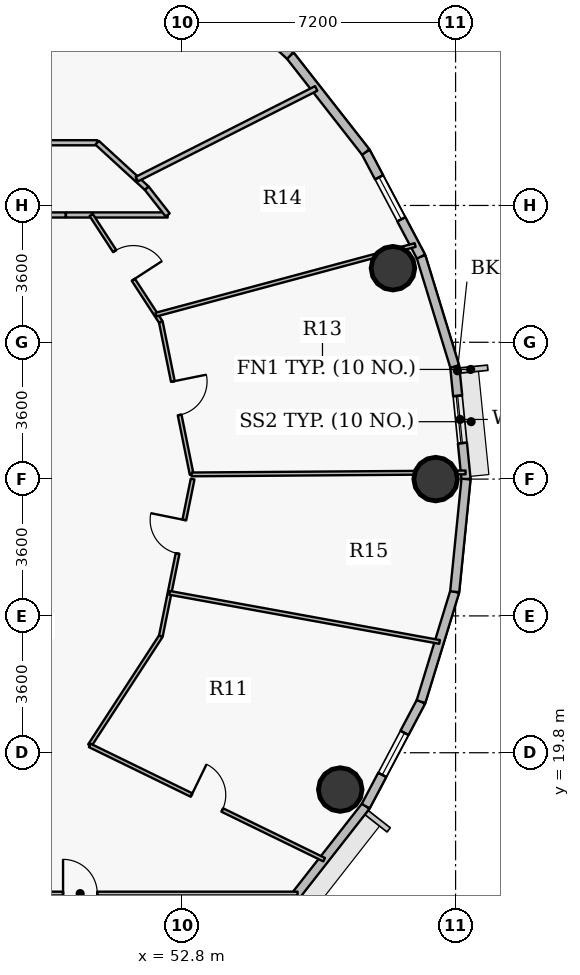
"""IFC4 building model, lengths in metres.
Left out: names, types, materials, properties, quantities, classifications, styles, units other than length and angle.
Written with IfcOpenShell. Run it as: python <this file> out.ifc"""

import sys

from ifc_helpers import new_model, si_unit, direction, frame, frame_2d, origin, origin_2d, place, context, subcontext, project, spatial, rectangle, hollow_circle, extrude, source, transform, mapped, element, fill, save


model = new_model("IFC4")
c1 = context("Model", 3, precision=1e-05, world=origin(), true_north=direction((0.0, 1.0)))
c2 = subcontext(c1, "Body", "Model", "MODEL_VIEW")
j1 = project(units=[si_unit("LENGTHUNIT", "METRE"), si_unit("PLANEANGLEUNIT", "RADIAN")], contexts=[c1])
p1 = place(None, origin())
s1 = spatial("IfcSite", under=j1, at=p1, CompositionType="ELEMENT")
p2 = place(p1, origin())
s2 = spatial("IfcBuilding", under=s1, at=p2, CompositionType="ELEMENT")
p3 = place(p2, frame((0.0, 0.0, 225.3)))
s3 = spatial("IfcBuildingStorey", under=s2, at=p3, CompositionType="ELEMENT", Elevation=225.3)
for number, where, z_axis, x_axis in (
    (1, (59.475, 27.0, 0.0), (0.0, 0.0, 1.0), (1.0, 0.0, 0.0)),
    (2, (58.351, 32.549, 0.0), (0.0, 0.0, 1.0), (1.0, 0.0, 0.0)),
    (3, (56.965, 18.831, 0.0), (0.0, 0.0, 1.0), (1.0, 0.0, 0.0)),
):
    element("IfcColumn", number, at=place(p3, frame(where, z_axis=z_axis, x_axis=x_axis)), inside=s3, PredefinedType="COLUMN", context=c2, shape_type="SweptSolid", body=[
        extrude(hollow_circle(Radius=0.575, WallThickness=0.036, at=origin_2d()), origin(), (0.0, 0.0, 1.0), 3.75),
    ])
p4 = place(p3, frame((59.977, 29.964, 0.0), z_axis=(0.0, 0.0, 1.0), x_axis=(0.099990595253, -0.994988382274, 0.0)))
e4 = element("IfcWall", 4, at=p4, inside=s3, PredefinedType="SOLIDWALL", context=c2, shape_type="SweptSolid", body=[
    extrude(rectangle(XDim=2.979, YDim=0.24, at=frame_2d((1.489, 0.0))), origin(), (0.0, 0.0, 1.0), 3.5),
])
p5 = place(p4, frame((0.777, 0.0, 0.9)))
e5 = element("IfcOpeningElement", 5, at=p5, cuts=e4, PredefinedType="OPENING", context=c2, shape_type="SweptSolid", body=[
    extrude(rectangle(XDim=1.25, YDim=1.65, at=origin_2d()), frame((0.625, 0.13, 0.825), z_axis=(0.0, -1.0, 0.0), x_axis=(1.0, 0.0, 0.0)), (0.0, 0.0, 1.0), 0.26),
])
p6 = place(p3, frame((59.09, 32.856, 0.0), z_axis=(0.0, 0.0, 1.0), x_axis=(0.293132907334, -0.95607170162, 0.0)))
e6 = element("IfcWall", 6, at=p6, inside=s3, PredefinedType="SOLIDWALL", context=c2, shape_type="SweptSolid", body=[
    extrude(rectangle(XDim=3.025, YDim=0.24, at=frame_2d((1.512, 0.0))), origin(), (0.0, 0.0, 1.0), 3.5),
])
p7 = place(p3, frame((57.636, 35.605, 0.0), z_axis=(0.0, 0.0, 1.0), x_axis=(0.46766049993, -0.883908172157, 0.0)))
e7 = element("IfcWall", 7, at=p7, inside=s3, PredefinedType="SOLIDWALL", context=c2, shape_type="SweptSolid", body=[
    extrude(rectangle(XDim=3.11, YDim=0.24, at=frame_2d((1.555, 0.0))), origin(), (0.0, 0.0, 1.0), 3.5),
])
p8 = place(p7, frame((0.751, 0.0, 0.9)))
e8 = element("IfcOpeningElement", 8, at=p8, cuts=e7, PredefinedType="OPENING", context=c2, shape_type="SweptSolid", body=[
    extrude(rectangle(XDim=1.25, YDim=1.65, at=origin_2d()), frame((0.625, 0.13, 0.825), z_axis=(0.0, -1.0, 0.0), x_axis=(1.0, 0.0, 0.0)), (0.0, 0.0, 1.0), 0.26),
])
p9 = place(p3, frame((55.648, 38.145, 0.0), z_axis=(0.0, 0.0, 1.0), x_axis=(0.616312344705, -0.787501805562, 0.0)))
e9 = element("IfcWall", 9, at=p9, inside=s3, PredefinedType="SOLIDWALL", context=c2, shape_type="SweptSolid", body=[
    extrude(rectangle(XDim=3.225, YDim=0.24, at=frame_2d((1.612, 0.0))), origin(), (0.0, 0.0, 1.0), 3.5),
])
p10 = place(p3, frame((53.176, 40.411, 0.0), z_axis=(0.0, 0.0, 1.0), x_axis=(0.737123922599, -0.675757591694, 0.0)))
e10 = element("IfcWall", 10, at=p10, inside=s3, PredefinedType="SOLIDWALL", context=c2, shape_type="SweptSolid", body=[
    extrude(rectangle(XDim=3.354, YDim=0.24, at=frame_2d((1.677, 0.0))), origin(), (0.0, 0.0, 1.0), 3.5),
])
p11 = place(p10, frame((1.152, 0.0, 0.0)))
e11 = element("IfcOpeningElement", 11, at=p11, cuts=e10, PredefinedType="OPENING", context=c2, shape_type="SweptSolid", body=[
    extrude(rectangle(XDim=1.05, YDim=2.15, at=origin_2d()), frame((0.525, 0.13, 1.075), z_axis=(0.0, -1.0, 0.0), x_axis=(1.0, 0.0, 0.0)), (0.0, 0.0, 1.0), 0.26),
])
p12 = place(p3, frame((57.636, 18.395, 0.0), z_axis=(0.0, 0.0, 1.0), x_axis=(-0.616312344705, -0.787501805562, 0.0)))
e12 = element("IfcWall", 12, at=p12, inside=s3, PredefinedType="SOLIDWALL", context=c2, shape_type="SweptSolid", body=[
    extrude(rectangle(XDim=3.225, YDim=0.24, at=frame_2d((1.612, 0.0))), origin(), (0.0, 0.0, 1.0), 3.5),
])
p13 = place(p3, frame((59.09, 21.144, 0.0), z_axis=(0.0, 0.0, 1.0), x_axis=(-0.46766049993, -0.883908172157, 0.0)))
e13 = element("IfcWall", 13, at=p13, inside=s3, PredefinedType="SOLIDWALL", context=c2, shape_type="SweptSolid", body=[
    extrude(rectangle(XDim=3.11, YDim=0.24, at=frame_2d((1.555, 0.0))), origin(), (0.0, 0.0, 1.0), 3.5),
])
p14 = place(p13, frame((0.93, 0.0, 0.9)))
e14 = element("IfcOpeningElement", 14, at=p14, cuts=e13, PredefinedType="OPENING", context=c2, shape_type="SweptSolid", body=[
    extrude(rectangle(XDim=1.25, YDim=1.65, at=origin_2d()), frame((0.625, 0.13, 0.825), z_axis=(0.0, -1.0, 0.0), x_axis=(1.0, 0.0, 0.0)), (0.0, 0.0, 1.0), 0.26),
])
p15 = place(p3, frame((59.977, 24.036, 0.0), z_axis=(0.0, 0.0, 1.0), x_axis=(-0.293132907334, -0.95607170162, 0.0)))
e15 = element("IfcWall", 15, at=p15, inside=s3, PredefinedType="SOLIDWALL", context=c2, shape_type="SweptSolid", body=[
    extrude(rectangle(XDim=3.025, YDim=0.24, at=frame_2d((1.512, 0.0))), origin(), (0.0, 0.0, 1.0), 3.5),
])
p16 = place(p3, frame((60.275, 27.0, 0.0), z_axis=(0.0, 0.0, 1.0), x_axis=(-0.099990595253, -0.994988382274, 0.0)))
e16 = element("IfcWall", 16, at=p16, inside=s3, PredefinedType="SOLIDWALL", context=c2, shape_type="SweptSolid", body=[
    extrude(rectangle(XDim=2.979, YDim=0.24, at=frame_2d((1.489, 0.0))), origin(), (0.0, 0.0, 1.0), 3.5),
])
p17 = place(p3, frame((24.35, 35.85, 0.0), z_axis=(0.0, 0.0, 1.0), x_axis=(1.0, 0.0, 0.0)))
e17 = element("IfcWall", 17, at=p17, inside=s3, PredefinedType="PARTITIONING", context=c2, shape_type="SweptSolid", body=[
    extrude(rectangle(XDim=26.218, YDim=0.135, at=frame_2d((13.109, 0.0))), origin(), (0.0, 0.0, 1.0), 2.935),
])
p18 = place(p17, frame((3.557, 0.0, 0.0)))
e18 = element("IfcOpeningElement", 18, at=p18, cuts=e17, PredefinedType="OPENING", context=c2, shape_type="SweptSolid", body=[
    extrude(rectangle(XDim=1.0, YDim=2.15, at=origin_2d()), frame((0.5, 0.078, 1.075), z_axis=(0.0, -1.0, 0.0), x_axis=(1.0, 0.0, 0.0)), (0.0, 0.0, 1.0), 0.155),
])
p19 = place(p17, frame((22.776, 0.0, 0.0)))
e19 = element("IfcOpeningElement", 19, at=p19, cuts=e17, PredefinedType="OPENING", context=c2, shape_type="SweptSolid", body=[
    extrude(rectangle(XDim=1.0, YDim=2.15, at=origin_2d()), frame((0.5, 0.078, 1.075), z_axis=(0.0, -1.0, 0.0), x_axis=(1.0, 0.0, 0.0)), (0.0, 0.0, 1.0), 0.155),
])
p20 = place(p17, frame((13.736, 0.0, 0.0)))
e20 = element("IfcOpeningElement", 20, at=p20, cuts=e17, PredefinedType="OPENING", context=c2, shape_type="SweptSolid", body=[
    extrude(rectangle(XDim=1.05, YDim=2.15, at=origin_2d()), frame((0.525, 0.078, 1.075), z_axis=(0.0, -1.0, 0.0), x_axis=(1.0, 0.0, 0.0)), (0.0, 0.0, 1.0), 0.155),
])
p21 = place(p17, frame((10.682, 0.0, 0.0)))
e21 = element("IfcOpeningElement", 21, at=p21, cuts=e17, PredefinedType="OPENING", context=c2, shape_type="SweptSolid", body=[
    extrude(rectangle(XDim=1.05, YDim=2.15, at=origin_2d()), frame((0.525, 0.078, 1.075), z_axis=(0.0, -1.0, 0.0), x_axis=(1.0, 0.0, 0.0)), (0.0, 0.0, 1.0), 0.155),
])
p22 = place(p17, frame((8.557, 0.0, 0.0)))
e22 = element("IfcOpeningElement", 22, at=p22, cuts=e17, PredefinedType="OPENING", context=c2, shape_type="SweptSolid", body=[
    extrude(rectangle(XDim=0.82, YDim=2.1, at=origin_2d()), frame((0.41, 0.078, 1.05), z_axis=(0.0, -1.0, 0.0), x_axis=(1.0, 0.0, 0.0)), (0.0, 0.0, 1.0), 0.155),
])
p23 = place(p3, frame((44.401, 16.094, 0.0), z_axis=(0.0, 0.0, 1.0), x_axis=(1.0, 0.0, 0.0)))
e23 = element("IfcWall", 23, at=p23, inside=s3, PredefinedType="PARTITIONING", context=c2, shape_type="SweptSolid", body=[
    extrude(rectangle(XDim=11.441, YDim=0.1, at=frame_2d((5.72, 0.0))), origin(), (0.0, 0.0, 1.0), 2.935),
])
p24 = place(p23, frame((5.271, 0.0, 0.0)))
e24 = element("IfcOpeningElement", 24, at=p24, cuts=e23, PredefinedType="OPENING", context=c2, shape_type="SweptSolid", body=[
    extrude(rectangle(XDim=0.9, YDim=2.1, at=origin_2d()), frame((0.45, 0.06, 1.05), z_axis=(0.0, -1.0, 0.0), x_axis=(1.0, 0.0, 0.0)), (0.0, 0.0, 1.0), 0.12),
])
p25 = place(p3, frame((49.748, 33.95, 0.0), z_axis=(0.0, 0.0, 1.0), x_axis=(1.0, 0.0, 0.0)))
e25 = element("IfcWall", 25, at=p25, inside=s3, PredefinedType="PARTITIONING", context=c2, shape_type="SweptSolid", body=[
    extrude(rectangle(XDim=2.676, YDim=0.135, at=frame_2d((1.338, 0.0))), origin(), (0.0, 0.0, 1.0), 3.5),
])
p26 = place(p3, frame((50.374, 19.993, 0.0), z_axis=(0.0, 0.0, 1.0), x_axis=(0.545433660686, 0.838153996465, 0.0)))
e26 = element("IfcWall", 26, at=p26, inside=s3, PredefinedType="PARTITIONING", context=c2, shape_type="SweptSolid", body=[
    extrude(rectangle(XDim=3.43, YDim=0.1, at=frame_2d((1.715, 0.0))), origin(), (0.0, 0.0, 1.0), 2.935),
])
p27 = place(p3, frame((50.374, 19.993, 0.0), z_axis=(0.0, 0.0, 1.0), x_axis=(0.898866241562, -0.438223093618, 0.0)))
e27 = element("IfcWall", 27, at=p27, inside=s3, PredefinedType="PARTITIONING", context=c2, shape_type="SweptSolid", body=[
    extrude(rectangle(XDim=6.86, YDim=0.1, at=frame_2d((3.43, 0.0))), origin(), (0.0, 0.0, 1.0), 2.985),
])
p28 = place(p27, frame((2.98, 0.0, 0.0)))
e28 = element("IfcOpeningElement", 28, at=p28, cuts=e27, PredefinedType="OPENING", context=c2, shape_type="SweptSolid", body=[
    extrude(rectangle(XDim=0.9, YDim=2.1, at=origin_2d()), frame((0.45, 0.06, 1.05), z_axis=(0.0, -1.0, 0.0), x_axis=(1.0, 0.0, 0.0)), (0.0, 0.0, 1.0), 0.12),
])
p29 = place(p3, frame((50.411, 33.95, 0.0), z_axis=(0.0, 0.0, 1.0), x_axis=(0.545427530909, -0.838157985422, 0.0)))
e29 = element("IfcWall", 29, at=p29, inside=s3, PredefinedType="PARTITIONING", context=c2, shape_type="SweptSolid", body=[
    extrude(rectangle(XDim=3.36, YDim=0.1, at=frame_2d((1.68, 0.0))), origin(), (0.0, 0.0, 1.0), 2.935),
])
p30 = place(p29, frame((1.135, 0.0, 0.0)))
e30 = element("IfcOpeningElement", 30, at=p30, cuts=e29, PredefinedType="OPENING", context=c2, shape_type="SweptSolid", body=[
    extrude(rectangle(XDim=0.9, YDim=2.1, at=origin_2d()), frame((0.45, 0.06, 1.05), z_axis=(0.0, -1.0, 0.0), x_axis=(1.0, 0.0, 0.0)), (0.0, 0.0, 1.0), 0.12),
])
p31 = place(p3, frame((50.568, 35.85, 0.0), z_axis=(0.0, 0.0, 1.0), x_axis=(0.737032525587, -0.675857275042, 0.0)))
e31 = element("IfcWall", 31, at=p31, inside=s3, PredefinedType="PARTITIONING", context=c2, shape_type="SweptSolid", body=[
    extrude(rectangle(XDim=1.417, YDim=0.135, at=frame_2d((0.708, 0.0))), origin(), (0.0, 0.0, 1.0), 3.5),
])
p32 = place(p3, frame((51.62, 34.886, 0.0), z_axis=(0.0, 0.0, 1.0), x_axis=(0.736889635292, -0.676013065998, 0.0)))
e32 = element("IfcWall", 32, at=p32, inside=s3, PredefinedType="PARTITIONING", context=c2, shape_type="SweptSolid", body=[
    extrude(rectangle(XDim=0.345, YDim=0.135, at=frame_2d((0.172, 0.0))), origin(), (0.0, 0.0, 1.0), 3.5),
])
p33 = place(p3, frame((51.612, 34.893, 0.0), z_axis=(0.0, 0.0, 1.0), x_axis=(0.892442847759, 0.451160463122, 0.0)))
e33 = element("IfcWall", 33, at=p33, inside=s3, PredefinedType="PARTITIONING", context=c2, shape_type="SweptSolid", body=[
    extrude(rectangle(XDim=5.289, YDim=0.135, at=frame_2d((2.645, 0.0))), origin(), (0.0, 0.0, 1.0), 2.985),
])
p34 = place(p3, frame((51.874, 34.653, 0.0), z_axis=(0.0, 0.0, 1.0), x_axis=(0.61628613448, -0.787522317429, 0.0)))
e34 = element("IfcWall", 34, at=p34, inside=s3, PredefinedType="PARTITIONING", context=c2, shape_type="SweptSolid", body=[
    extrude(rectangle(XDim=0.893, YDim=0.135, at=frame_2d((0.446, 0.0))), origin(), (0.0, 0.0, 1.0), 3.5),
])
p35 = place(p3, frame((52.117, 31.328, 0.0), z_axis=(0.0, 0.0, 1.0), x_axis=(0.965792157348, 0.259317390095, 0.0)))
e35 = element("IfcWall", 35, at=p35, inside=s3, PredefinedType="PARTITIONING", context=c2, shape_type="SweptSolid", body=[
    extrude(rectangle(XDim=7.06, YDim=0.1, at=frame_2d((3.53, 0.0))), origin(), (0.0, 0.0, 1.0), 2.985),
])
p36 = place(p3, frame((52.244, 22.867, 0.0), z_axis=(0.0, 0.0, 1.0), x_axis=(0.198264809747, 0.980148491411, 0.0)))
e36 = element("IfcWall", 36, at=p36, inside=s3, PredefinedType="PARTITIONING", context=c2, shape_type="SweptSolid", body=[
    extrude(rectangle(XDim=4.216, YDim=0.1, at=frame_2d((2.108, 0.0))), origin(), (0.0, 0.0, 1.0), 2.935),
])
p37 = place(p36, frame((2.219, 0.0, 0.0)))
e37 = element("IfcOpeningElement", 37, at=p37, cuts=e36, PredefinedType="OPENING", context=c2, shape_type="SweptSolid", body=[
    extrude(rectangle(XDim=0.9, YDim=2.1, at=origin_2d()), frame((0.45, 0.06, 1.05), z_axis=(0.0, -1.0, 0.0), x_axis=(1.0, 0.0, 0.0)), (0.0, 0.0, 1.0), 0.12),
])
p38 = place(p3, frame((52.244, 31.133, 0.0), z_axis=(0.0, 0.0, 1.0), x_axis=(0.198216162216, -0.980158330596, 0.0)))
e38 = element("IfcWall", 38, at=p38, inside=s3, PredefinedType="PARTITIONING", context=c2, shape_type="SweptSolid", body=[
    extrude(rectangle(XDim=4.09, YDim=0.1, at=frame_2d((2.045, 0.0))), origin(), (0.0, 0.0, 1.0), 2.935),
])
p39 = place(p38, frame((1.595, 0.0, 0.0)))
e39 = element("IfcOpeningElement", 39, at=p39, cuts=e38, PredefinedType="OPENING", context=c2, shape_type="SweptSolid", body=[
    extrude(rectangle(XDim=0.9, YDim=2.1, at=origin_2d()), frame((0.45, 0.06, 1.05), z_axis=(0.0, -1.0, 0.0), x_axis=(1.0, 0.0, 0.0)), (0.0, 0.0, 1.0), 0.12),
])
p40 = place(p3, frame((52.474, 24.006, 0.0), z_axis=(0.0, 0.0, 1.0), x_axis=(0.98388667926, -0.178793183242, 0.0)))
e40 = element("IfcWall", 40, at=p40, inside=s3, PredefinedType="PARTITIONING", context=c2, shape_type="SweptSolid", body=[
    extrude(rectangle(XDim=7.219, YDim=0.1, at=frame_2d((3.61, 0.0))), origin(), (0.0, 0.0, 1.0), 2.985),
])
p41 = place(p3, frame((53.055, 27.123, 0.0), z_axis=(0.0, 0.0, 1.0), x_axis=(0.999973728257, 0.007248640941, 0.0)))
e41 = element("IfcWall", 41, at=p41, inside=s3, PredefinedType="PARTITIONING", context=c2, shape_type="SweptSolid", body=[
    extrude(rectangle(XDim=7.208, YDim=0.1, at=frame_2d((3.604, 0.0))), origin(), (0.0, 0.0, 1.0), 2.935),
])
p42 = place(p3, frame((49.738, 33.95, 0.0), z_axis=(0.0, 0.0, 1.0), x_axis=(-1.0, 0.0, 0.0)))
e42 = element("IfcWall", 42, at=p42, inside=s3, PredefinedType="PARTITIONING", context=c2, shape_type="SweptSolid", body=[
    extrude(rectangle(XDim=3.938, YDim=0.135, at=frame_2d((1.969, 0.0))), origin(), (0.0, 0.0, 1.0), 3.5),
])
m1 = source(origin(), c2, "Body", "SweptSolid", [
    extrude(rectangle(XDim=1.25, YDim=1.65, at=origin_2d()), frame((0.625, 0.03, 0.825), z_axis=(0.0, -1.0, 0.0), x_axis=(1.0, 0.0, 0.0)), (0.0, 0.0, 1.0), 0.06),
])
p43 = place(p5, origin())
e43 = element("IfcWindow", 43, at=p43, inside=s3, PartitioningType="SINGLE_PANEL", PredefinedType="WINDOW", context=c2, shape_type="MappedRepresentation", body=[
    mapped(m1, transform((0.0, 0.0, 0.0), x_axis=(1.0, 0.0, 0.0), y_axis=(0.0, 1.0, 0.0), z_axis=(0.0, 0.0, 1.0), scale=1.0)),
])
fill(e5, e43)
p44 = place(p8, origin())
e44 = element("IfcWindow", 44, at=p44, inside=s3, PartitioningType="SINGLE_PANEL", PredefinedType="WINDOW", context=c2, shape_type="MappedRepresentation", body=[
    mapped(m1, transform((0.0, 0.0, 0.0), x_axis=(1.0, 0.0, 0.0), y_axis=(0.0, 1.0, 0.0), z_axis=(0.0, 0.0, 1.0), scale=1.0)),
])
fill(e8, e44)
p45 = place(p14, origin())
e45 = element("IfcWindow", 45, at=p45, inside=s3, PartitioningType="SINGLE_PANEL", PredefinedType="WINDOW", context=c2, shape_type="MappedRepresentation", body=[
    mapped(m1, transform((0.0, 0.0, 0.0), x_axis=(1.0, 0.0, 0.0), y_axis=(0.0, 1.0, 0.0), z_axis=(0.0, 0.0, 1.0), scale=1.0)),
])
fill(e14, e45)
m2 = source(origin(), c2, "Body", "SweptSolid", [
    extrude(rectangle(XDim=0.9, YDim=2.1, at=origin_2d()), frame((0.45, 0.025, 1.05), z_axis=(0.0, -1.0, 0.0), x_axis=(1.0, 0.0, 0.0)), (0.0, 0.0, 1.0), 0.05),
])
p46 = place(p28, origin())
e46 = element("IfcDoor", 46, at=p46, inside=s3, OperationType="SINGLE_SWING_LEFT", PredefinedType="DOOR", context=c2, shape_type="MappedRepresentation", body=[
    mapped(m2, transform((0.0, 0.0, 0.0), x_axis=(1.0, 0.0, 0.0), y_axis=(0.0, 1.0, 0.0), z_axis=(0.0, 0.0, 1.0), scale=1.0)),
])
fill(e28, e46)
p47 = place(p37, origin())
e47 = element("IfcDoor", 47, at=p47, inside=s3, OperationType="SINGLE_SWING_RIGHT", PredefinedType="DOOR", context=c2, shape_type="MappedRepresentation", body=[
    mapped(m2, transform((0.0, 0.0, 0.0), x_axis=(1.0, 0.0, 0.0), y_axis=(0.0, 1.0, 0.0), z_axis=(0.0, 0.0, 1.0), scale=1.0)),
])
fill(e37, e47)
p48 = place(p39, origin())
e48 = element("IfcDoor", 48, at=p48, inside=s3, OperationType="SINGLE_SWING_LEFT", PredefinedType="DOOR", context=c2, shape_type="MappedRepresentation", body=[
    mapped(m2, transform((0.0, 0.0, 0.0), x_axis=(1.0, 0.0, 0.0), y_axis=(0.0, 1.0, 0.0), z_axis=(0.0, 0.0, 1.0), scale=1.0)),
])
fill(e39, e48)
p49 = place(p30, origin())
e49 = element("IfcDoor", 49, at=p49, inside=s3, OperationType="SINGLE_SWING_RIGHT", PredefinedType="DOOR", context=c2, shape_type="MappedRepresentation", body=[
    mapped(m2, transform((0.0, 0.0, 0.0), x_axis=(1.0, 0.0, 0.0), y_axis=(0.0, 1.0, 0.0), z_axis=(0.0, 0.0, 1.0), scale=1.0)),
])
fill(e30, e49)
p50 = place(p24, origin())
e50 = element("IfcDoor", 50, at=p50, inside=s3, OperationType="SINGLE_SWING_LEFT", PredefinedType="DOOR", context=c2, shape_type="MappedRepresentation", body=[
    mapped(m2, transform((0.0, 0.0, 0.0), x_axis=(1.0, 0.0, 0.0), y_axis=(0.0, 1.0, 0.0), z_axis=(0.0, 0.0, 1.0), scale=1.0)),
])
fill(e24, e50)
save(model, sys.argv[1])
